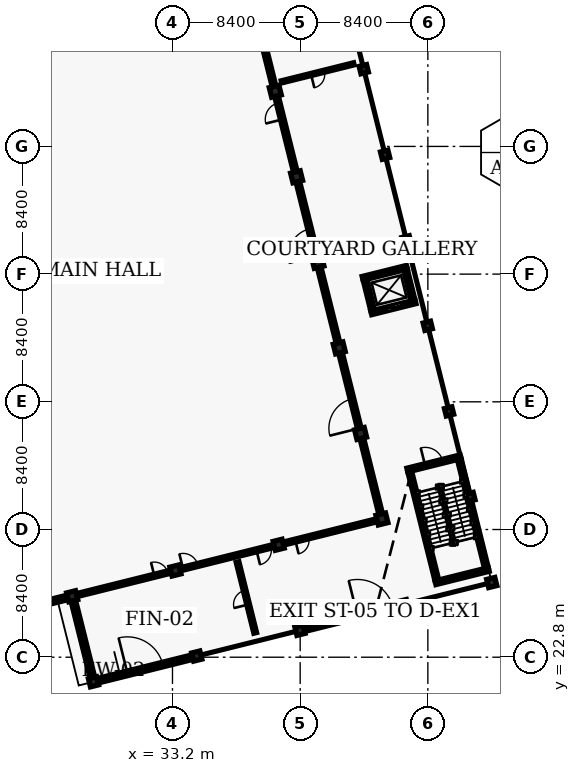
"""IFC4 building model, lengths in metres.
Left out: names, types, materials, properties, quantities, classifications, styles, units other than length and angle.
Written with IfcOpenShell. Run it as: python <this file> out.ifc"""

import sys

from ifc_helpers import new_model, si_unit, direction, frame, frame_2d, origin, origin_2d, place, context, subcontext, project, spatial, rectangle, extrude, element, fill, save


model = new_model("IFC4")
c1 = context("Model", 3, precision=1e-05, world=origin(), true_north=direction((0.0, 1.0)))
c2 = subcontext(c1, "Body", "Model", "MODEL_VIEW")
j1 = project(units=[si_unit("LENGTHUNIT", "METRE"), si_unit("PLANEANGLEUNIT", "RADIAN")], contexts=[c1])
p1 = place(None, origin())
s1 = spatial("IfcSite", under=j1, at=p1, CompositionType="ELEMENT")
p2 = place(p1, origin())
s2 = spatial("IfcBuilding", under=s1, at=p2, CompositionType="ELEMENT")
p3 = place(p2, origin())
s3 = spatial("IfcBuildingStorey", under=s2, at=p3, CompositionType="ELEMENT", Elevation=0.0)
for number, where, z_axis, x_axis in (
    (1, (46.978, 31.891, 0.0), (0.0, 0.0, 1.0), (0.97, 0.242, 0.0)),
    (2, (45.575, 37.518, 0.0), (0.0, 0.0, 1.0), (0.97, 0.242, 0.0)),
    (3, (44.171, 43.146, 0.0), (0.0, 0.0, 1.0), (0.97, 0.242, 0.0)),
    (4, (42.768, 48.774, 0.0), (0.0, 0.0, 1.0), (0.97, 0.242, 0.0)),
    (5, (41.365, 54.402, 0.0), (0.0, 0.0, 1.0), (0.97, 0.242, 0.0)),
    (6, (39.962, 60.029, 0.0), (0.0, 0.0, 1.0), (0.97, 0.242, 0.0)),
):
    element("IfcColumn", number, at=place(p3, frame(where, z_axis=z_axis, x_axis=x_axis)), inside=s3, PredefinedType="COLUMN", context=c2, shape_type="SweptSolid", body=[
        extrude(rectangle(XDim=0.65, YDim=0.65, at=origin_2d()), origin(), (0.0, 0.0, 1.0), 4.8),
    ])
for number, where, z_axis, x_axis in (
    (7, (52.799, 33.342, 0.0), (0.0, 0.0, 1.0), (0.97, 0.242, 0.0)),
    (8, (51.396, 38.97, 0.0), (0.0, 0.0, 1.0), (0.97, 0.242, 0.0)),
    (9, (49.993, 44.598, 0.0), (0.0, 0.0, 1.0), (0.97, 0.242, 0.0)),
    (10, (48.59, 50.225, 0.0), (0.0, 0.0, 1.0), (0.97, 0.242, 0.0)),
    (11, (47.187, 55.853, 0.0), (0.0, 0.0, 1.0), (0.97, 0.242, 0.0)),
    (12, (45.784, 61.481, 0.0), (0.0, 0.0, 1.0), (0.97, 0.242, 0.0)),
):
    element("IfcColumn", number, at=place(p3, frame(where, z_axis=z_axis, x_axis=x_axis)), inside=s3, PredefinedType="COLUMN", context=c2, shape_type="SweptSolid", body=[
        extrude(rectangle(XDim=0.5, YDim=0.5, at=origin_2d()), origin(), (0.0, 0.0, 1.0), 4.8),
    ])
for number, where, z_axis, x_axis in (
    (13, (28.005, 21.183, 0.0), (0.0, 0.0, 1.0), (0.97, 0.242, 0.0)),
    (14, (34.797, 22.876, 0.0), (0.0, 0.0, 1.0), (0.97, 0.242, 0.0)),
    (15, (41.589, 24.569, 0.0), (0.0, 0.0, 1.0), (0.97, 0.242, 0.0)),
    (16, (48.381, 26.263, 0.0), (0.0, 0.0, 1.0), (0.97, 0.242, 0.0)),
    (17, (54.203, 27.714, 0.0), (0.0, 0.0, 1.0), (0.97, 0.242, 0.0)),
):
    element("IfcColumn", number, at=place(p3, frame(where, z_axis=z_axis, x_axis=x_axis)), inside=s3, PredefinedType="COLUMN", context=c2, shape_type="SweptSolid", body=[
        extrude(rectangle(XDim=0.55, YDim=0.55, at=origin_2d()), origin(), (0.0, 0.0, 1.0), 4.8),
    ])
for number, where, z_axis, x_axis in (
    (18, (26.602, 26.81, 0.0), (0.0, 0.0, 1.0), (0.97, 0.242, 0.0)),
    (19, (33.394, 28.504, 0.0), (0.0, 0.0, 1.0), (0.97, 0.242, 0.0)),
    (20, (40.186, 30.197, 0.0), (0.0, 0.0, 1.0), (0.97, 0.242, 0.0)),
):
    element("IfcColumn", number, at=place(p3, frame(where, z_axis=z_axis, x_axis=x_axis)), inside=s3, PredefinedType="COLUMN", context=c2, shape_type="SweptSolid", body=[
        extrude(rectangle(XDim=0.6, YDim=0.6, at=origin_2d()), origin(), (0.0, 0.0, 1.0), 4.8),
    ])
p4 = place(p3, frame((28.102, 21.207, 0.0), z_axis=(0.0, 0.0, 1.0), x_axis=(0.970296478685, 0.241918877831, 0.0)))
e21 = element("IfcWall", 21, at=p4, inside=s3, PredefinedType="SOLIDWALL", context=c2, shape_type="SweptSolid", body=[
    extrude(rectangle(XDim=6.8, YDim=0.3, at=frame_2d((3.4, 0.0))), origin(), (0.0, 0.0, 1.0), 4.065),
])
p5 = place(p4, frame((2.2, 0.0, 0.0)))
e22 = element("IfcOpeningElement", 22, at=p5, cuts=e21, PredefinedType="OPENING", context=c2, shape_type="SweptSolid", body=[
    extrude(rectangle(XDim=2.4, YDim=2.4, at=frame_2d((1.2, 1.2))), frame((0.0, 0.16, 0.0), z_axis=(0.0, -1.0, 0.0), x_axis=(1.0, 0.0, 0.0)), (0.0, 0.0, 1.0), 0.32),
])
p6 = place(p3, frame((41.686, 24.594, 0.0), z_axis=(0.0, 0.0, 1.0), x_axis=(0.970296478685, 0.241918877831, 0.0)))
e23 = element("IfcWall", 23, at=p6, inside=s3, PredefinedType="SOLIDWALL", context=c2, shape_type="SweptSolid", body=[
    extrude(rectangle(XDim=6.8, YDim=0.3, at=frame_2d((3.4, 0.0))), origin(), (0.0, 0.0, 1.0), 4.065),
])
p7 = place(p6, frame((3.8, 0.0, 0.0)))
e24 = element("IfcOpeningElement", 24, at=p7, cuts=e23, PredefinedType="OPENING", context=c2, shape_type="SweptSolid", body=[
    extrude(rectangle(XDim=2.4, YDim=2.4, at=frame_2d((1.2, 1.2))), frame((0.0, 0.16, 0.0), z_axis=(0.0, -1.0, 0.0), x_axis=(1.0, 0.0, 0.0)), (0.0, 0.0, 1.0), 0.32),
])
p8 = place(p3, frame((27.986, 21.261, 0.0), z_axis=(0.0, 0.0, 1.0), x_axis=(-0.242077152267, 0.970257003247, 0.0)))
e25 = element("IfcWall", 25, at=p8, inside=s3, PredefinedType="SOLIDWALL", context=c2, shape_type="SweptSolid", body=[
    extrude(rectangle(XDim=5.639, YDim=0.3, at=frame_2d((2.819, 0.0))), origin(), (0.0, 0.0, 1.0), 4.095),
])
p9 = place(p3, frame((19.887, 25.136, 0.0), z_axis=(0.0, 0.0, 1.0), x_axis=(0.970287194641, 0.241956111549, 0.0)))
e26 = element("IfcWall", 26, at=p9, inside=s3, PredefinedType="SOLIDWALL", context=c2, shape_type="SweptSolid", body=[
    extrude(rectangle(XDim=6.84, YDim=0.3, at=frame_2d((3.42, 0.0))), origin(), (0.0, 0.0, 1.0), 4.085),
])
p10 = place(p3, frame((48.653, 35.112, 0.0), z_axis=(0.0, 0.0, 1.0), x_axis=(0.97025377679, 0.242090083699, 0.0)))
e27 = element("IfcWall", 27, at=p10, inside=s3, PredefinedType="SHEAR", context=c2, shape_type="SweptSolid", body=[
    extrude(rectangle(XDim=3.61, YDim=0.25, at=frame_2d((1.805, 0.0))), origin(), (0.0, 0.0, 1.0), 4.56),
])
p11 = place(p10, frame((1.205, 0.0, 0.0)))
e28 = element("IfcOpeningElement", 28, at=p11, cuts=e27, PredefinedType="OPENING", context=c2, shape_type="SweptSolid", body=[
    extrude(rectangle(XDim=1.2, YDim=2.15, at=frame_2d((0.6, 1.075))), frame((0.0, 0.135, 0.0), z_axis=(0.0, -1.0, 0.0), x_axis=(1.0, 0.0, 0.0)), (0.0, 0.0, 1.0), 0.27),
])
p12 = place(p3, frame((54.004, 28.572, 0.0), z_axis=(0.0, 0.0, 1.0), x_axis=(-0.970301456204, -0.241898912952, 0.0)))
e29 = element("IfcWall", 29, at=p12, inside=s3, PredefinedType="SHEAR", context=c2, shape_type="SweptSolid", body=[
    extrude(rectangle(XDim=3.609, YDim=0.25, at=frame_2d((1.805, 0.0))), origin(), (0.0, 0.0, 1.0), 4.56),
])
p13 = place(p3, frame((52.065, 35.834, 0.0), z_axis=(0.0, 0.0, 1.0), x_axis=(0.241944845077, -0.97029000404, 0.0)))
e30 = element("IfcWall", 30, at=p13, inside=s3, PredefinedType="SHEAR", context=c2, shape_type="SweptSolid", body=[
    extrude(rectangle(XDim=7.39, YDim=0.25, at=frame_2d((3.695, 0.0))), origin(), (0.0, 0.0, 1.0), 4.56),
])
p14 = place(p3, frame((50.593, 27.851, 0.0), z_axis=(0.0, 0.0, 1.0), x_axis=(-0.241975869228, 0.970282267544, 0.0)))
e31 = element("IfcWall", 31, at=p14, inside=s3, PredefinedType="SHEAR", context=c2, shape_type="SweptSolid", body=[
    extrude(rectangle(XDim=7.389, YDim=0.25, at=frame_2d((3.695, 0.0))), origin(), (0.0, 0.0, 1.0), 4.56),
])
p15 = place(p3, frame((46.276, 45.454, 0.0), z_axis=(0.0, 0.0, 1.0), x_axis=(0.970276420912, 0.241999312028, 0.0)))
e32 = element("IfcWall", 32, at=p15, inside=s3, PredefinedType="SHEAR", context=c2, shape_type="SweptSolid", body=[
    extrude(rectangle(XDim=2.999, YDim=0.25, at=frame_2d((1.5, 0.0))), origin(), (0.0, 0.0, 1.0), 4.56),
])
p16 = place(p15, frame((0.95, 0.0, 0.0)))
e33 = element("IfcOpeningElement", 33, at=p16, cuts=e32, PredefinedType="OPENING", context=c2, shape_type="SweptSolid", body=[
    extrude(rectangle(XDim=1.1, YDim=2.15, at=frame_2d((0.55, 1.075))), frame((0.0, 0.135, 0.0), z_axis=(0.0, -1.0, 0.0), x_axis=(1.0, 0.0, 0.0)), (0.0, 0.0, 1.0), 0.27),
])
p17 = place(p3, frame((48.62, 48.45, 0.0), z_axis=(0.0, 0.0, 1.0), x_axis=(-0.970276420912, -0.241999312028, 0.0)))
e34 = element("IfcWall", 34, at=p17, inside=s3, PredefinedType="SHEAR", context=c2, shape_type="SweptSolid", body=[
    extrude(rectangle(XDim=2.999, YDim=0.25, at=frame_2d((1.5, 0.0))), origin(), (0.0, 0.0, 1.0), 4.56),
])
p18 = place(p3, frame((49.029, 46.274, 0.0), z_axis=(0.0, 0.0, 1.0), x_axis=(-0.241817773214, 0.970321680969, 0.0)))
e35 = element("IfcWall", 35, at=p18, inside=s3, PredefinedType="SHEAR", context=c2, shape_type="SweptSolid", body=[
    extrude(rectangle(XDim=2.081, YDim=0.25, at=frame_2d((1.041, 0.0))), origin(), (0.0, 0.0, 1.0), 4.56),
])
p19 = place(p3, frame((45.867, 47.63, 0.0), z_axis=(0.0, 0.0, 1.0), x_axis=(0.241845306756, -0.970314818809, 0.0)))
e36 = element("IfcWall", 36, at=p19, inside=s3, PredefinedType="SHEAR", context=c2, shape_type="SweptSolid", body=[
    extrude(rectangle(XDim=2.081, YDim=0.25, at=frame_2d((1.04, 0.0))), origin(), (0.0, 0.0, 1.0), 4.56),
])
p20 = place(p3, frame((46.893, 32.231, 0.0), z_axis=(0.0, 0.0, 1.0), x_axis=(-0.24195052599, 0.970288587469, 0.0)))
e37 = element("IfcWall", 37, at=p20, inside=s3, PredefinedType="PARTITIONING", context=c2, shape_type="SweptSolid", body=[
    extrude(rectangle(XDim=10.899, YDim=0.24, at=frame_2d((5.449, 0.0))), origin(), (0.0, 0.0, 1.0), 3.845),
])
p21 = place(p20, frame((5.799, 0.0, 0.0)))
e38 = element("IfcOpeningElement", 38, at=p21, cuts=e37, PredefinedType="OPENING", context=c2, shape_type="SweptSolid", body=[
    extrude(rectangle(XDim=2.0, YDim=2.3, at=frame_2d((1.0, 1.15))), frame((0.0, 0.13, 0.0), z_axis=(0.0, -1.0, 0.0), x_axis=(1.0, 0.0, 0.0)), (0.0, 0.0, 1.0), 0.26),
])
p22 = place(p3, frame((44.086, 43.486, 0.0), z_axis=(0.0, 0.0, 1.0), x_axis=(-0.24184513843, 0.970314860763, 0.0)))
e39 = element("IfcWall", 39, at=p22, inside=s3, PredefinedType="PARTITIONING", context=c2, shape_type="SweptSolid", body=[
    extrude(rectangle(XDim=10.899, YDim=0.24, at=frame_2d((5.45, 0.0))), origin(), (0.0, 0.0, 1.0), 4.006),
])
p23 = place(p22, frame((5.875, 0.0, 0.0)))
e40 = element("IfcOpeningElement", 40, at=p23, cuts=e39, PredefinedType="OPENING", context=c2, shape_type="SweptSolid", body=[
    extrude(rectangle(XDim=1.85, YDim=2.22, at=frame_2d((0.925, 1.11))), frame((0.0, 0.13, 0.0), z_axis=(0.0, -1.0, 0.0), x_axis=(1.0, 0.0, 0.0)), (0.0, 0.0, 1.0), 0.26),
])
p24 = place(p3, frame((41.28, 54.742, 0.0), z_axis=(0.0, 0.0, 1.0), x_axis=(-0.241866165603, 0.970309619625, 0.0)))
e41 = element("IfcWall", 41, at=p24, inside=s3, PredefinedType="PARTITIONING", context=c2, shape_type="SweptSolid", body=[
    extrude(rectangle(XDim=10.898, YDim=0.24, at=frame_2d((5.449, 0.0))), origin(), (0.0, 0.0, 1.0), 4.006),
])
p25 = place(p24, frame((3.539, 0.0, 0.0)))
e42 = element("IfcOpeningElement", 42, at=p25, cuts=e41, PredefinedType="OPENING", context=c2, shape_type="SweptSolid", body=[
    extrude(rectangle(XDim=1.12, YDim=2.16, at=frame_2d((0.56, 1.08))), frame((0.0, 0.13, 0.0), z_axis=(0.0, -1.0, 0.0), x_axis=(1.0, 0.0, 0.0)), (0.0, 0.0, 1.0), 0.26),
])
p26 = place(p3, frame((26.942, 26.895, 0.0), z_axis=(0.0, 0.0, 1.0), x_axis=(0.970294418067, 0.241927142478, 0.0)))
e43 = element("IfcWall", 43, at=p26, inside=s3, PredefinedType="PARTITIONING", context=c2, shape_type="SweptSolid", body=[
    extrude(rectangle(XDim=20.299, YDim=0.2, at=frame_2d((10.149, 0.0))), origin(), (0.0, 0.0, 1.0), 3.845),
])
p27 = place(p26, frame((7.166, 0.0, 0.0)))
e44 = element("IfcOpeningElement", 44, at=p27, cuts=e43, PredefinedType="OPENING", context=c2, shape_type="SweptSolid", body=[
    extrude(rectangle(XDim=1.0, YDim=2.14, at=frame_2d((0.5, 1.07))), frame((0.0, 0.11, 0.0), z_axis=(0.0, -1.0, 0.0), x_axis=(1.0, 0.0, 0.0)), (0.0, 0.0, 1.0), 0.22),
])
p28 = place(p26, frame((12.143, 0.0, 0.0)))
e45 = element("IfcOpeningElement", 45, at=p28, cuts=e43, PredefinedType="OPENING", context=c2, shape_type="SweptSolid", body=[
    extrude(rectangle(XDim=0.98, YDim=2.12, at=frame_2d((0.49, 1.06))), frame((0.0, 0.11, 0.0), z_axis=(0.0, -1.0, 0.0), x_axis=(1.0, 0.0, 0.0)), (0.0, 0.0, 1.0), 0.22),
])
p29 = place(p26, frame((5.219, 0.0, 0.0)))
e46 = element("IfcOpeningElement", 46, at=p29, cuts=e43, PredefinedType="OPENING", context=c2, shape_type="SweptSolid", body=[
    extrude(rectangle(XDim=0.9, YDim=2.06, at=frame_2d((0.45, 1.03))), frame((0.0, 0.11, 0.0), z_axis=(0.0, -1.0, 0.0), x_axis=(1.0, 0.0, 0.0)), (0.0, 0.0, 1.0), 0.22),
])
p30 = place(p26, frame((14.779, 0.0, 0.0)))
e47 = element("IfcOpeningElement", 47, at=p30, cuts=e43, PredefinedType="OPENING", context=c2, shape_type="SweptSolid", body=[
    extrude(rectangle(XDim=0.9, YDim=2.06, at=frame_2d((0.45, 1.03))), frame((0.0, 0.11, 0.0), z_axis=(0.0, -1.0, 0.0), x_axis=(1.0, 0.0, 0.0)), (0.0, 0.0, 1.0), 0.22),
])
p31 = place(p3, frame((38.642, 24.402, 0.0), z_axis=(0.0, 0.0, 1.0), x_axis=(-0.241925168697, 0.970294910195, 0.0)))
e48 = element("IfcWall", 48, at=p31, inside=s3, PredefinedType="PARTITIONING", context=c2, shape_type="SweptSolid", body=[
    extrude(rectangle(XDim=4.8, YDim=0.18, at=frame_2d((2.4, 0.0))), origin(), (0.0, 0.0, 1.0), 4.545),
])
p32 = place(p31, frame((1.92, 0.0, 0.0)))
e49 = element("IfcOpeningElement", 49, at=p32, cuts=e48, PredefinedType="OPENING", context=c2, shape_type="SweptSolid", body=[
    extrude(rectangle(XDim=0.96, YDim=2.08, at=frame_2d((0.48, 1.04))), frame((0.0, 0.1, 0.0), z_axis=(0.0, -1.0, 0.0), x_axis=(1.0, 0.0, 0.0)), (0.0, 0.0, 1.0), 0.2),
])
p33 = place(p3, frame((40.375, 60.648, 0.0), z_axis=(0.0, 0.0, 1.0), x_axis=(0.970306426655, 0.241878974681, 0.0)))
e50 = element("IfcWall", 50, at=p33, inside=s3, PredefinedType="PARTITIONING", context=c2, shape_type="SweptSolid", body=[
    extrude(rectangle(XDim=4.899, YDim=0.14, at=frame_2d((2.45, 0.0))), origin(), (0.0, 0.0, 1.0), 4.187),
])
p34 = place(p33, frame((2.0, 0.0, 0.0)))
e51 = element("IfcOpeningElement", 51, at=p34, cuts=e50, PredefinedType="OPENING", context=c2, shape_type="SweptSolid", body=[
    extrude(rectangle(XDim=0.9, YDim=2.06, at=frame_2d((0.45, 1.03))), frame((0.0, 0.08, 0.0), z_axis=(0.0, -1.0, 0.0), x_axis=(1.0, 0.0, 0.0)), (0.0, 0.0, 1.0), 0.16),
])
p35 = place(p11, origin())
e52 = element("IfcDoor", 52, at=p35, inside=s3, OperationType="SINGLE_SWING_LEFT", PredefinedType="DOOR", context=c2, shape_type="SweptSolid", body=[
    extrude(rectangle(XDim=1.2, YDim=2.15, at=frame_2d((0.6, 1.075))), frame((0.0, 0.025, 0.0), z_axis=(0.0, -1.0, 0.0), x_axis=(1.0, 0.0, 0.0)), (0.0, 0.0, 1.0), 0.05),
])
fill(e28, e52)
p36 = place(p16, origin())
e53 = element("IfcDoor", 53, at=p36, inside=s3, OperationType="SLIDING_TO_LEFT", PredefinedType="DOOR", context=c2, shape_type="SweptSolid", body=[
    extrude(rectangle(XDim=1.1, YDim=2.15, at=frame_2d((0.55, 1.075))), frame((0.0, 0.025, 0.0), z_axis=(0.0, -1.0, 0.0), x_axis=(1.0, 0.0, 0.0)), (0.0, 0.0, 1.0), 0.05),
])
fill(e33, e53)
p37 = place(p5, origin())
e54 = element("IfcDoor", 54, at=p37, inside=s3, OperationType="DOUBLE_DOOR_SINGLE_SWING", PredefinedType="DOOR", context=c2, shape_type="SweptSolid", body=[
    extrude(rectangle(XDim=2.4, YDim=2.4, at=frame_2d((1.2, 1.2))), frame((0.0, 0.025, 0.0), z_axis=(0.0, -1.0, 0.0), x_axis=(1.0, 0.0, 0.0)), (0.0, 0.0, 1.0), 0.05),
])
fill(e22, e54)
p38 = place(p7, origin())
e55 = element("IfcDoor", 55, at=p38, inside=s3, OperationType="DOUBLE_DOOR_SINGLE_SWING", PredefinedType="DOOR", context=c2, shape_type="SweptSolid", body=[
    extrude(rectangle(XDim=2.4, YDim=2.4, at=frame_2d((1.2, 1.2))), frame((0.0, 0.025, 0.0), z_axis=(0.0, -1.0, 0.0), x_axis=(1.0, 0.0, 0.0)), (0.0, 0.0, 1.0), 0.05),
])
fill(e24, e55)
p39 = place(p21, origin())
e56 = element("IfcDoor", 56, at=p39, inside=s3, OperationType="DOUBLE_DOOR_SINGLE_SWING", PredefinedType="DOOR", context=c2, shape_type="SweptSolid", body=[
    extrude(rectangle(XDim=2.0, YDim=2.3, at=frame_2d((1.0, 1.15))), frame((0.0, 0.025, 0.0), z_axis=(0.0, -1.0, 0.0), x_axis=(1.0, 0.0, 0.0)), (0.0, 0.0, 1.0), 0.05),
])
fill(e38, e56)
p40 = place(p23, origin())
e57 = element("IfcDoor", 57, at=p40, inside=s3, OperationType="DOUBLE_DOOR_SINGLE_SWING", PredefinedType="DOOR", context=c2, shape_type="SweptSolid", body=[
    extrude(rectangle(XDim=1.85, YDim=2.22, at=frame_2d((0.925, 1.11))), frame((0.0, 0.025, 0.0), z_axis=(0.0, -1.0, 0.0), x_axis=(1.0, 0.0, 0.0)), (0.0, 0.0, 1.0), 0.05),
])
fill(e40, e57)
p41 = place(p25, origin())
e58 = element("IfcDoor", 58, at=p41, inside=s3, OperationType="SINGLE_SWING_LEFT", PredefinedType="DOOR", context=c2, shape_type="SweptSolid", body=[
    extrude(rectangle(XDim=1.12, YDim=2.16, at=frame_2d((0.56, 1.08))), frame((0.0, 0.025, 0.0), z_axis=(0.0, -1.0, 0.0), x_axis=(1.0, 0.0, 0.0)), (0.0, 0.0, 1.0), 0.05),
])
fill(e42, e58)
p42 = place(p27, origin())
e59 = element("IfcDoor", 59, at=p42, inside=s3, OperationType="SINGLE_SWING_LEFT", PredefinedType="DOOR", context=c2, shape_type="SweptSolid", body=[
    extrude(rectangle(XDim=1.0, YDim=2.14, at=frame_2d((0.5, 1.07))), frame((0.0, 0.025, 0.0), z_axis=(0.0, -1.0, 0.0), x_axis=(1.0, 0.0, 0.0)), (0.0, 0.0, 1.0), 0.05),
])
fill(e44, e59)
p43 = place(p28, origin())
e60 = element("IfcDoor", 60, at=p43, inside=s3, OperationType="SINGLE_SWING_RIGHT", PredefinedType="DOOR", context=c2, shape_type="SweptSolid", body=[
    extrude(rectangle(XDim=0.98, YDim=2.12, at=frame_2d((0.49, 1.06))), frame((0.0, 0.025, 0.0), z_axis=(0.0, -1.0, 0.0), x_axis=(1.0, 0.0, 0.0)), (0.0, 0.0, 1.0), 0.05),
])
fill(e45, e60)
p44 = place(p32, origin())
e61 = element("IfcDoor", 61, at=p44, inside=s3, OperationType="SINGLE_SWING_LEFT", PredefinedType="DOOR", context=c2, shape_type="SweptSolid", body=[
    extrude(rectangle(XDim=0.96, YDim=2.08, at=frame_2d((0.48, 1.04))), frame((0.0, 0.025, 0.0), z_axis=(0.0, -1.0, 0.0), x_axis=(1.0, 0.0, 0.0)), (0.0, 0.0, 1.0), 0.05),
])
fill(e49, e61)
p45 = place(p34, origin())
e62 = element("IfcDoor", 62, at=p45, inside=s3, OperationType="SINGLE_SWING_RIGHT", PredefinedType="DOOR", context=c2, shape_type="SweptSolid", body=[
    extrude(rectangle(XDim=0.9, YDim=2.06, at=frame_2d((0.45, 1.03))), frame((0.0, 0.025, 0.0), z_axis=(0.0, -1.0, 0.0), x_axis=(1.0, 0.0, 0.0)), (0.0, 0.0, 1.0), 0.05),
])
fill(e51, e62)
p46 = place(p29, origin())
e63 = element("IfcDoor", 63, at=p46, inside=s3, OperationType="SINGLE_SWING_LEFT", PredefinedType="DOOR", context=c2, shape_type="SweptSolid", body=[
    extrude(rectangle(XDim=0.9, YDim=2.06, at=frame_2d((0.45, 1.03))), frame((0.0, 0.025, 0.0), z_axis=(0.0, -1.0, 0.0), x_axis=(1.0, 0.0, 0.0)), (0.0, 0.0, 1.0), 0.05),
])
fill(e46, e63)
p47 = place(p30, origin())
e64 = element("IfcDoor", 64, at=p47, inside=s3, OperationType="SINGLE_SWING_RIGHT", PredefinedType="DOOR", context=c2, shape_type="SweptSolid", body=[
    extrude(rectangle(XDim=0.9, YDim=2.06, at=frame_2d((0.45, 1.03))), frame((0.0, 0.025, 0.0), z_axis=(0.0, -1.0, 0.0), x_axis=(1.0, 0.0, 0.0)), (0.0, 0.0, 1.0), 0.05),
])
fill(e47, e64)
save(model, sys.argv[1])
